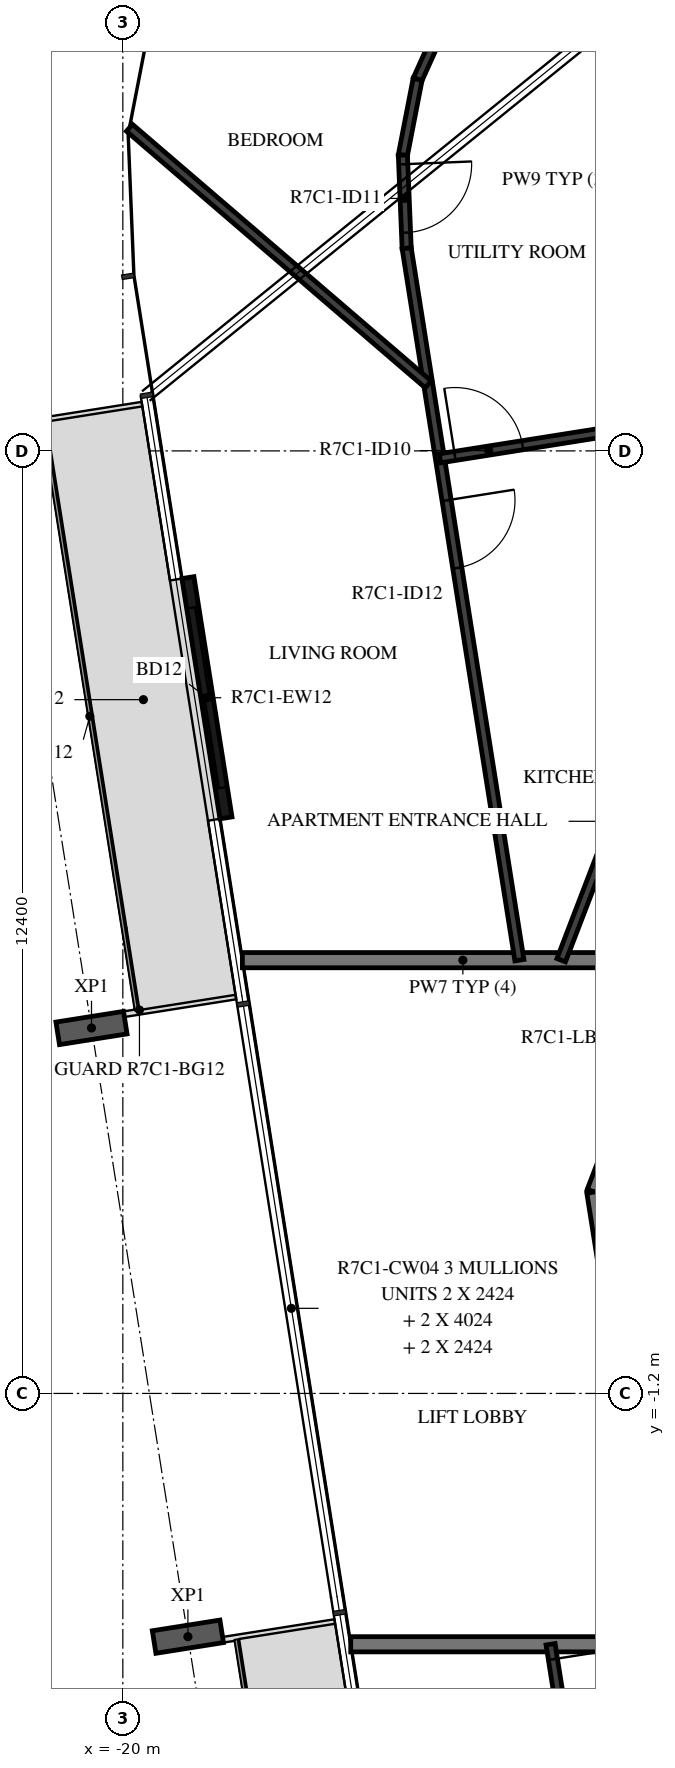
"""IFC4 building model, lengths in metres.
Left out: names, types, materials, properties, quantities, classifications, styles, units other than length and angle.
Written with IfcOpenShell. Run it as: python <this file> out.ifc"""

import sys

from ifc_helpers import new_model, si_unit, direction, frame, frame_2d, origin, origin_2d, place, context, subcontext, project, spatial, rectangle, i_section, extrude, element, fill, save


model = new_model("IFC4")
c1 = context("Model", 3, precision=1e-05, world=origin(), true_north=direction((0.0, 1.0)))
c2 = subcontext(c1, "Body", "Model", "MODEL_VIEW")
j1 = project(units=[si_unit("LENGTHUNIT", "METRE"), si_unit("PLANEANGLEUNIT", "RADIAN")], contexts=[c1])
p1 = place(None, origin())
s1 = spatial("IfcSite", under=j1, at=p1, CompositionType="ELEMENT")
p2 = place(p1, origin())
s2 = spatial("IfcBuilding", under=s1, at=p2, CompositionType="ELEMENT")
p3 = place(p2, frame((0.0, 0.0, 287.9)))
s3 = spatial("IfcBuildingStorey", under=s2, at=p3, CompositionType="ELEMENT", Elevation=287.9)
for number, where, z_axis, x_axis in (
    (1, (-20.412, 3.608, -0.38), (0.0, 0.0, 1.0), (-0.156, 0.988, 0.0)),
    (2, (-19.144, -4.4, -0.38), (0.0, 0.0, 1.0), (-0.156, 0.988, 0.0)),
):
    element("IfcColumn", number, at=place(p3, frame(where, z_axis=z_axis, x_axis=x_axis)), inside=s3, PredefinedType="COLUMN", context=c2, shape_type="SweptSolid", body=[
        extrude(i_section(OverallWidth=0.3, OverallDepth=0.9, WebThickness=0.019, FlangeThickness=0.035, FilletRadius=0.03, at=origin_2d()), origin(), (0.0, 0.0, 1.0), 2.616),
    ])
p4 = place(p3, frame((-19.144, 9.533, 0.0), z_axis=(0.0, 0.0, 1.0), x_axis=(0.156401347891, -0.987693585267, 0.0)))
e3 = element("IfcWall", 3, at=p4, inside=s3, PredefinedType="STANDARD", context=c2, shape_type="SweptSolid", body=[
    extrude(rectangle(XDim=3.2, YDim=0.16, at=frame_2d((1.6, 0.0))), origin(), (0.0, 0.0, 1.0), 3.05),
])
p5 = place(p4, frame((0.4, 0.0, 0.0)))
e4 = element("IfcOpeningElement", 4, at=p5, cuts=e3, PredefinedType="OPENING", context=c2, shape_type="SweptSolid", body=[
    extrude(rectangle(XDim=2.4, YDim=2.4, at=frame_2d((1.2, 1.2))), frame((0.0, 0.09, 0.0), z_axis=(0.0, -1.0, 0.0), x_axis=(1.0, 0.0, 0.0)), (0.0, 0.0, 1.0), 0.18),
])
p6 = place(p3, frame((-11.223, 8.154, 0.0), z_axis=(0.0, 0.0, 1.0), x_axis=(-0.358341090983, -0.93359073609, 0.0)))
e5 = element("IfcWall", 5, at=p6, inside=s3, PredefinedType="STANDARD", context=c2, shape_type="SweptSolid", body=[
    extrude(rectangle(XDim=7.181, YDim=0.2, at=frame_2d((3.59, 0.0))), origin(), (0.0, 0.0, 1.0), 3.05),
])
p7 = place(p6, frame((4.114, 0.0, 0.0)))
e6 = element("IfcOpeningElement", 6, at=p7, cuts=e5, PredefinedType="OPENING", context=c2, shape_type="SweptSolid", body=[
    extrude(rectangle(XDim=1.8, YDim=2.1, at=frame_2d((0.9, 1.05))), frame((0.0, 0.11, 0.0), z_axis=(0.0, -1.0, 0.0), x_axis=(1.0, 0.0, 0.0)), (0.0, 0.0, 1.0), 0.22),
])
p8 = place(p3, frame((-13.797, 1.45, 0.0), z_axis=(0.0, 0.0, 1.0), x_axis=(0.156421704315, -0.987690361611, 0.0)))
e7 = element("IfcWall", 7, at=p8, inside=s3, PredefinedType="STANDARD", context=c2, shape_type="SweptSolid", body=[
    extrude(rectangle(XDim=7.181, YDim=0.2, at=frame_2d((3.591, 0.0))), origin(), (0.0, 0.0, 1.0), 3.05),
])
p9 = place(p3, frame((-12.626, 4.5, 0.0), z_axis=(0.0, 0.0, 1.0), x_axis=(-1.0, 0.0, 0.0)))
e8 = element("IfcWall", 8, at=p9, inside=s3, PredefinedType="STANDARD", context=c2, shape_type="SweptSolid", body=[
    extrude(rectangle(XDim=5.802, YDim=0.2, at=frame_2d((2.901, 0.0))), origin(), (0.0, 0.0, 1.0), 3.05),
])
p10 = place(p3, frame((-17.002, -4.5, 0.0), z_axis=(0.0, 0.0, 1.0), x_axis=(1.0, 0.0, 0.0)))
e9 = element("IfcWall", 9, at=p10, inside=s3, PredefinedType="STANDARD", context=c2, shape_type="SweptSolid", body=[
    extrude(rectangle(XDim=4.148, YDim=0.2, at=frame_2d((2.074, 0.0))), origin(), (0.0, 0.0, 1.0), 3.05),
])
p11 = place(p3, frame((-16.953, 20.936, 0.0), z_axis=(0.0, 0.0, 1.0), x_axis=(0.629331057166, -0.777137324085, 0.0)))
e10 = element("IfcWall", 10, at=p11, inside=s3, PredefinedType="STANDARD", context=c2, shape_type="SweptSolid", body=[
    extrude(rectangle(XDim=6.08, YDim=0.2, at=frame_2d((3.04, 0.0))), origin(), (0.0, 0.0, 1.0), 3.05),
])
p12 = place(p3, frame((-12.479, 9.067, 0.0), z_axis=(0.0, 0.0, 1.0), x_axis=(-0.358387060848, -0.933573090131, 0.0)))
e11 = element("IfcWall", 11, at=p12, inside=s3, PredefinedType="PARTITIONING", context=c2, shape_type="SweptSolid", body=[
    extrude(rectangle(XDim=4.892, YDim=0.12, at=frame_2d((2.446, 0.0))), origin(), (0.0, 0.0, 1.0), 3.05),
])
p13 = place(p3, frame((-15.798, 16.805, 0.0), z_axis=(0.0, 0.0, 1.0), x_axis=(-0.411861127809, -0.911246624904, 0.0)))
e12 = element("IfcWall", 12, at=p13, inside=s3, PredefinedType="PARTITIONING", context=c2, shape_type="SweptSolid", body=[
    extrude(rectangle(XDim=0.787, YDim=0.12, at=frame_2d((0.393, 0.0))), origin(), (0.0, 0.0, 1.0), 3.05),
])
p14 = place(p3, frame((-16.122, 16.088, 0.0), z_axis=(0.0, 0.0, 1.0), x_axis=(-0.191030445301, -0.981584112019, 0.0)))
e13 = element("IfcWall", 13, at=p14, inside=s3, PredefinedType="PARTITIONING", context=c2, shape_type="SweptSolid", body=[
    extrude(rectangle(XDim=1.016, YDim=0.12, at=frame_2d((0.508, 0.0))), origin(), (0.0, 0.0, 1.0), 3.05),
])
p15 = place(p3, frame((-16.316, 15.091, 0.0), z_axis=(0.0, 0.0, 1.0), x_axis=(0.040786423131, -0.999167887639, 0.0)))
e14 = element("IfcWall", 14, at=p15, inside=s3, PredefinedType="PARTITIONING", context=c2, shape_type="SweptSolid", body=[
    extrude(rectangle(XDim=1.227, YDim=0.12, at=frame_2d((0.614, 0.0))), origin(), (0.0, 0.0, 1.0), 3.05),
])
p16 = place(p15, frame((0.12, 0.0, 0.0)))
e15 = element("IfcOpeningElement", 15, at=p16, cuts=e14, PredefinedType="OPENING", context=c2, shape_type="SweptSolid", body=[
    extrude(rectangle(XDim=0.9, YDim=2.1, at=frame_2d((0.45, 1.05))), frame((0.0, 0.07, 0.0), z_axis=(0.0, -1.0, 0.0), x_axis=(1.0, 0.0, 0.0)), (0.0, 0.0, 1.0), 0.14),
])
p17 = place(p3, frame((-16.266, 13.865, 0.0), z_axis=(0.0, 0.0, 1.0), x_axis=(0.156422690833, -0.987690205374, 0.0)))
e16 = element("IfcWall", 16, at=p17, inside=s3, PredefinedType="PARTITIONING", context=c2, shape_type="SweptSolid", body=[
    extrude(rectangle(XDim=9.482, YDim=0.12, at=frame_2d((4.741, 0.0))), origin(), (0.0, 0.0, 1.0), 3.05),
])
p18 = place(p17, frame((3.357, 0.0, 0.0)))
e17 = element("IfcOpeningElement", 17, at=p18, cuts=e16, PredefinedType="OPENING", context=c2, shape_type="SweptSolid", body=[
    extrude(rectangle(XDim=0.9, YDim=2.1, at=frame_2d((0.45, 1.05))), frame((0.0, 0.07, 0.0), z_axis=(0.0, -1.0, 0.0), x_axis=(1.0, 0.0, 0.0)), (0.0, 0.0, 1.0), 0.14),
])
p19 = place(p3, frame((-15.828, 11.102, 0.0), z_axis=(0.0, 0.0, 1.0), x_axis=(0.98768671358, 0.156444737262, 0.0)))
e18 = element("IfcWall", 18, at=p19, inside=s3, PredefinedType="PARTITIONING", context=c2, shape_type="SweptSolid", body=[
    extrude(rectangle(XDim=6.136, YDim=0.12, at=frame_2d((3.068, 0.0))), origin(), (0.0, 0.0, 1.0), 3.05),
])
p20 = place(p19, frame((0.2, 0.0, 0.0)))
e19 = element("IfcOpeningElement", 19, at=p20, cuts=e18, PredefinedType="OPENING", context=c2, shape_type="SweptSolid", body=[
    extrude(rectangle(XDim=0.9, YDim=2.1, at=frame_2d((0.45, 1.05))), frame((0.0, 0.07, 0.0), z_axis=(0.0, -1.0, 0.0), x_axis=(1.0, 0.0, 0.0)), (0.0, 0.0, 1.0), 0.14),
])
p21 = place(p3, frame((-19.913, 15.451, 0.0), z_axis=(0.0, 0.0, 1.0), x_axis=(0.758627615547, -0.651524474544, 0.0)))
e20 = element("IfcWall", 20, at=p21, inside=s3, PredefinedType="PARTITIONING", context=c2, shape_type="SweptSolid", body=[
    extrude(rectangle(XDim=5.181, YDim=0.12, at=frame_2d((2.591, 0.0))), origin(), (0.0, 0.0, 1.0), 3.05),
])
p22 = place(p3, frame((-14.373, -4.5, 0.0), z_axis=(0.0, 0.0, 1.0), x_axis=(0.156437152886, -0.987687914878, 0.0)))
e21 = element("IfcWall", 21, at=p22, inside=s3, PredefinedType="PARTITIONING", context=c2, shape_type="SweptSolid", body=[
    extrude(rectangle(XDim=1.796, YDim=0.12, at=frame_2d((0.898, 0.0))), origin(), (0.0, 0.0, 1.0), 3.05),
])
p23 = place(p22, frame((0.2, 0.0, 0.0)))
e22 = element("IfcOpeningElement", 22, at=p23, cuts=e21, PredefinedType="OPENING", context=c2, shape_type="SweptSolid", body=[
    extrude(rectangle(XDim=0.9, YDim=2.1, at=frame_2d((0.45, 1.05))), frame((0.0, 0.07, 0.0), z_axis=(0.0, -1.0, 0.0), x_axis=(1.0, 0.0, 0.0)), (0.0, 0.0, 1.0), 0.14),
])
p24 = place(p5, origin())
e23 = element("IfcDoor", 23, at=p24, inside=s3, OperationType="DOUBLE_DOOR_SLIDING", PredefinedType="DOOR", context=c2, shape_type="SweptSolid", body=[
    extrude(rectangle(XDim=2.4, YDim=2.4, at=frame_2d((1.2, 1.2))), frame((0.0, 0.025, 0.0), z_axis=(0.0, -1.0, 0.0), x_axis=(1.0, 0.0, 0.0)), (0.0, 0.0, 1.0), 0.05),
])
fill(e4, e23)
p25 = place(p20, origin())
e24 = element("IfcDoor", 24, at=p25, inside=s3, OperationType="SINGLE_SWING_LEFT", PredefinedType="DOOR", context=c2, shape_type="SweptSolid", body=[
    extrude(rectangle(XDim=0.9, YDim=2.1, at=frame_2d((0.45, 1.05))), frame((0.0, 0.025, 0.0), z_axis=(0.0, -1.0, 0.0), x_axis=(1.0, 0.0, 0.0)), (0.0, 0.0, 1.0), 0.05),
])
fill(e19, e24)
p26 = place(p16, origin())
e25 = element("IfcDoor", 25, at=p26, inside=s3, OperationType="SINGLE_SWING_RIGHT", PredefinedType="DOOR", context=c2, shape_type="SweptSolid", body=[
    extrude(rectangle(XDim=0.9, YDim=2.1, at=frame_2d((0.45, 1.05))), frame((0.0, 0.025, 0.0), z_axis=(0.0, -1.0, 0.0), x_axis=(1.0, 0.0, 0.0)), (0.0, 0.0, 1.0), 0.05),
])
fill(e15, e25)
p27 = place(p18, origin())
e26 = element("IfcDoor", 26, at=p27, inside=s3, OperationType="SINGLE_SWING_LEFT", PredefinedType="DOOR", context=c2, shape_type="SweptSolid", body=[
    extrude(rectangle(XDim=0.9, YDim=2.1, at=frame_2d((0.45, 1.05))), frame((0.0, 0.025, 0.0), z_axis=(0.0, -1.0, 0.0), x_axis=(1.0, 0.0, 0.0)), (0.0, 0.0, 1.0), 0.05),
])
fill(e17, e26)
p28 = place(p23, origin())
e27 = element("IfcDoor", 27, at=p28, inside=s3, OperationType="SINGLE_SWING_RIGHT", PredefinedType="DOOR", context=c2, shape_type="SweptSolid", body=[
    extrude(rectangle(XDim=0.9, YDim=2.1, at=frame_2d((0.45, 1.05))), frame((0.0, 0.025, 0.0), z_axis=(0.0, -1.0, 0.0), x_axis=(1.0, 0.0, 0.0)), (0.0, 0.0, 1.0), 0.05),
])
fill(e22, e27)
save(model, sys.argv[1])
